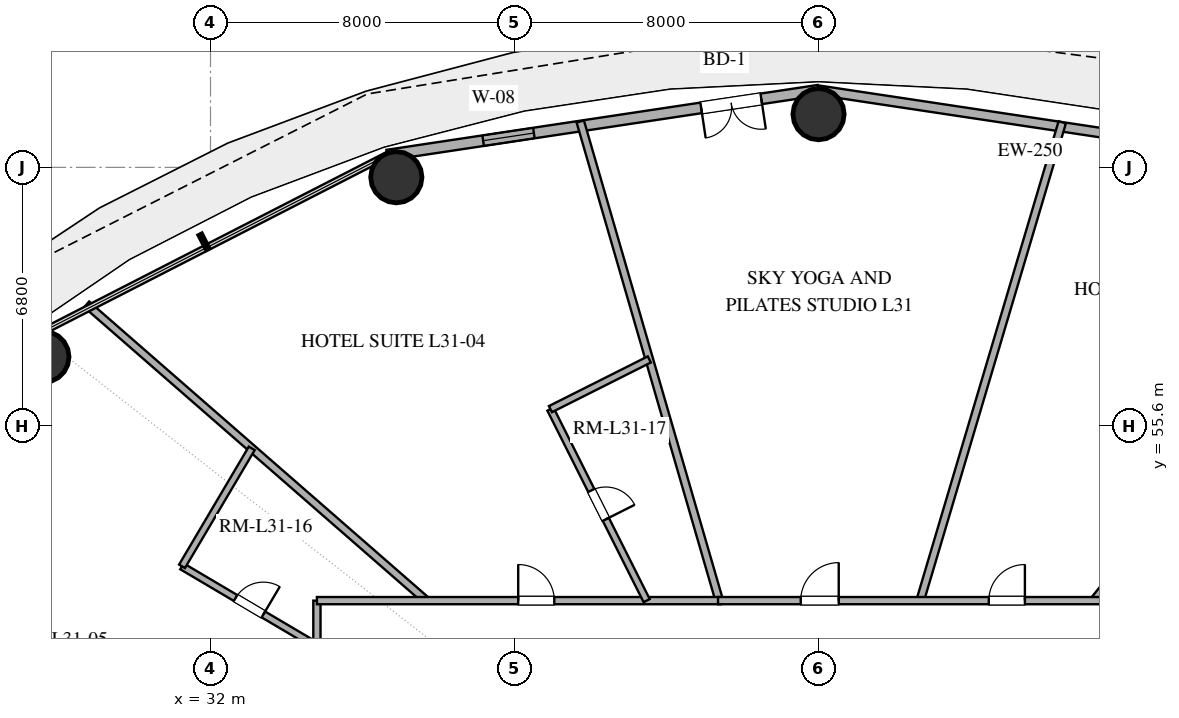
"""IFC4 building model, lengths in metres.
Left out: names, types, materials, properties, quantities, classifications, styles, units other than length and angle.
Written with IfcOpenShell. Run it as: python <this file> out.ifc"""

import sys

from ifc_helpers import new_model, si_unit, direction, frame, frame_2d, origin, origin_2d, place, context, subcontext, project, spatial, rectangle, hollow_circle, extrude, element, fill, save


model = new_model("IFC4")
c1 = context("Model", 3, precision=1e-05, world=origin(), true_north=direction((0.0, 1.0)))
c2 = subcontext(c1, "Body", "Model", "MODEL_VIEW")
j1 = project(units=[si_unit("LENGTHUNIT", "METRE"), si_unit("PLANEANGLEUNIT", "RADIAN")], contexts=[c1])
p1 = place(None, origin())
s1 = spatial("IfcSite", under=j1, at=p1, CompositionType="ELEMENT")
p2 = place(p1, origin())
s2 = spatial("IfcBuilding", under=s1, at=p2, CompositionType="ELEMENT")
p3 = place(p2, frame((0.0, 0.0, 123.6)))
s3 = spatial("IfcBuildingStorey", under=s2, at=p3, CompositionType="ELEMENT", Elevation=123.6)
for number, where, z_axis, x_axis in (
    (1, (48.0, 63.8, 0.0), (0.0, 0.0, 1.0), (1.0, 0.0, 0.0)),
    (2, (36.89, 62.141, 0.0), (0.0, 0.0, 1.0), (1.0, 0.0, 0.0)),
    (3, (27.602, 57.415, 0.0), (0.0, 0.0, 1.0), (1.0, 0.0, 0.0)),
):
    element("IfcColumn", number, at=place(p3, frame(where, z_axis=z_axis, x_axis=x_axis)), inside=s3, PredefinedType="COLUMN", context=c2, shape_type="SweptSolid", body=[
        extrude(hollow_circle(Radius=0.675, WallThickness=0.036, at=origin_2d()), origin(), (0.0, 0.0, 1.0), 3.38),
    ])
p4 = place(p3, frame((59.351, 62.723, 0.0), z_axis=(0.0, 0.0, 1.0), x_axis=(-0.988877774656, 0.148730450117, 0.0)))
e4 = element("IfcWall", 4, at=p4, inside=s3, PredefinedType="SOLIDWALL", context=c2, shape_type="SweptSolid", body=[
    extrude(rectangle(XDim=11.479, YDim=0.25, at=frame_2d((5.74, 0.0))), origin(), (0.0, 0.0, 1.0), 3.38),
])
p5 = place(p3, frame((48.0, 64.43, 0.0), z_axis=(0.0, 0.0, 1.0), x_axis=(-0.988877774656, -0.148730450117, 0.0)))
e5 = element("IfcWall", 5, at=p5, inside=s3, PredefinedType="SOLIDWALL", context=c2, shape_type="SweptSolid", body=[
    extrude(rectangle(XDim=11.479, YDim=0.28, at=frame_2d((5.74, 0.0))), origin(), (0.0, 0.0, 1.0), 3.38),
])
p6 = place(p5, frame((1.524, 0.0, 0.0)))
e6 = element("IfcOpeningElement", 6, at=p6, cuts=e5, PredefinedType="OPENING", context=c2, shape_type="SweptSolid", body=[
    extrude(rectangle(XDim=1.6, YDim=2.25, at=frame_2d((0.8, 1.125))), frame((0.0, 0.15, 0.0), z_axis=(0.0, -1.0, 0.0), x_axis=(1.0, 0.0, 0.0)), (0.0, 0.0, 1.0), 0.3),
])
p7 = place(p5, frame((7.575, 0.0, 0.85)))
e7 = element("IfcOpeningElement", 7, at=p7, cuts=e5, PredefinedType="OPENING", context=c2, shape_type="SweptSolid", body=[
    extrude(rectangle(XDim=1.35, YDim=1.8, at=frame_2d((0.675, 0.9))), frame((0.0, 0.15, 0.0), z_axis=(0.0, -1.0, 0.0), x_axis=(1.0, 0.0, 0.0)), (0.0, 0.0, 1.0), 0.3),
])
p8 = place(p3, frame((54.413, 63.586, 0.0), z_axis=(0.0, 0.0, 1.0), x_axis=(-0.284782789849, -0.958592073098, 0.0)))
e8 = element("IfcWall", 8, at=p8, inside=s3, PredefinedType="PARTITIONING", context=c2, shape_type="SweptSolid", body=[
    extrude(rectangle(XDim=13.129, YDim=0.2, at=frame_2d((6.565, 0.0))), origin(), (0.0, 0.0, 1.0), 2.74),
])
p9 = place(p3, frame((45.388, 51.0, 0.0), z_axis=(0.0, 0.0, 1.0), x_axis=(-0.278690680179, 0.960380916502, 0.0)))
e9 = element("IfcWall", 9, at=p9, inside=s3, PredefinedType="PARTITIONING", context=c2, shape_type="SweptSolid", body=[
    extrude(rectangle(XDim=13.127, YDim=0.2, at=frame_2d((6.563, 0.0))), origin(), (0.0, 0.0, 1.0), 2.74),
])
p10 = place(p3, frame((55.229, 51.0, 0.0), z_axis=(0.0, 0.0, 1.0), x_axis=(0.626239129839, 0.779631035977, 0.0)))
e10 = element("IfcWall", 10, at=p10, inside=s3, PredefinedType="PLUMBINGWALL", context=c2, shape_type="SweptSolid", body=[
    extrude(rectangle(XDim=6.223, YDim=0.18, at=frame_2d((3.112, 0.0))), origin(), (0.0, 0.0, 1.0), 2.74),
])
p11 = place(p10, frame((2.687, 0.0, 0.0)))
e11 = element("IfcOpeningElement", 11, at=p11, cuts=e10, PredefinedType="OPENING", context=c2, shape_type="SweptSolid", body=[
    extrude(rectangle(XDim=0.85, YDim=2.1, at=frame_2d((0.425, 1.05))), frame((0.0, 0.1, 0.0), z_axis=(0.0, -1.0, 0.0), x_axis=(1.0, 0.0, 0.0)), (0.0, 0.0, 1.0), 0.2),
])
p12 = place(p3, frame((37.68, 51.0, 0.0), z_axis=(0.0, 0.0, 1.0), x_axis=(-0.753659518717, 0.657265037749, 0.0)))
e12 = element("IfcWall", 12, at=p12, inside=s3, PredefinedType="PARTITIONING", context=c2, shape_type="SweptSolid", body=[
    extrude(rectangle(XDim=11.861, YDim=0.2, at=frame_2d((5.93, 0.0))), origin(), (0.0, 0.0, 1.0), 2.74),
])
p13 = place(p3, frame((34.8, 41.476, 0.0), z_axis=(0.0, 0.0, 1.0), x_axis=(0.0, 1.0, 0.0)))
e13 = element("IfcWall", 13, at=p13, inside=s3, PredefinedType="PARTITIONING", context=c2, shape_type="SweptSolid", body=[
    extrude(rectangle(XDim=9.524, YDim=0.19, at=frame_2d((4.762, 0.0))), origin(), (0.0, 0.0, 1.0), 2.74),
])
p14 = place(p13, frame((4.924, 0.0, 0.0)))
e14 = element("IfcOpeningElement", 14, at=p14, cuts=e13, PredefinedType="OPENING", context=c2, shape_type="SweptSolid", body=[
    extrude(rectangle(XDim=0.95, YDim=2.15, at=frame_2d((0.475, 1.075))), frame((0.0, 0.105, 0.0), z_axis=(0.0, -1.0, 0.0), x_axis=(1.0, 0.0, 0.0)), (0.0, 0.0, 1.0), 0.21),
])
p15 = place(p3, frame((34.8, 51.0, 0.0), z_axis=(0.0, 0.0, 1.0), x_axis=(1.0, 0.0, 0.0)))
e15 = element("IfcWall", 15, at=p15, inside=s3, PredefinedType="PARTITIONING", context=c2, shape_type="SweptSolid", body=[
    extrude(rectangle(XDim=10.622, YDim=0.19, at=frame_2d((5.311, 0.0))), origin(), (0.0, 0.0, 1.0), 2.74),
])
p16 = place(p15, frame((5.297, 0.0, 0.0)))
e16 = element("IfcOpeningElement", 16, at=p16, cuts=e15, PredefinedType="OPENING", context=c2, shape_type="SweptSolid", body=[
    extrude(rectangle(XDim=0.95, YDim=2.15, at=frame_2d((0.475, 1.075))), frame((0.0, 0.105, 0.0), z_axis=(0.0, -1.0, 0.0), x_axis=(1.0, 0.0, 0.0)), (0.0, 0.0, 1.0), 0.21),
])
p17 = place(p3, frame((40.945, 56.039, 0.0), z_axis=(0.0, 0.0, 1.0), x_axis=(0.44904833135, -0.893507468414, 0.0)))
e17 = element("IfcWall", 17, at=p17, inside=s3, PredefinedType="PLUMBINGWALL", context=c2, shape_type="SweptSolid", body=[
    extrude(rectangle(XDim=5.639, YDim=0.18, at=frame_2d((2.82, 0.0))), origin(), (0.0, 0.0, 1.0), 2.74),
])
p18 = place(p17, frame((2.395, 0.0, 0.0)))
e18 = element("IfcOpeningElement", 18, at=p18, cuts=e17, PredefinedType="OPENING", context=c2, shape_type="SweptSolid", body=[
    extrude(rectangle(XDim=0.85, YDim=2.1, at=frame_2d((0.425, 1.05))), frame((0.0, 0.1, 0.0), z_axis=(0.0, -1.0, 0.0), x_axis=(1.0, 0.0, 0.0)), (0.0, 0.0, 1.0), 0.2),
])
p19 = place(p3, frame((45.355, 51.0, 0.0), z_axis=(0.0, 0.0, 1.0), x_axis=(1.0, 0.0, 0.0)))
e19 = element("IfcWall", 19, at=p19, inside=s3, PredefinedType="PARTITIONING", context=c2, shape_type="SweptSolid", body=[
    extrude(rectangle(XDim=15.845, YDim=0.19, at=frame_2d((7.922, 0.0))), origin(), (0.0, 0.0, 1.0), 2.74),
])
p20 = place(p19, frame((2.176, 0.0, 0.0)))
e20 = element("IfcOpeningElement", 20, at=p20, cuts=e19, PredefinedType="OPENING", context=c2, shape_type="SweptSolid", body=[
    extrude(rectangle(XDim=1.0, YDim=2.2, at=frame_2d((0.5, 1.1))), frame((0.0, 0.105, 0.0), z_axis=(0.0, -1.0, 0.0), x_axis=(1.0, 0.0, 0.0)), (0.0, 0.0, 1.0), 0.21),
])
p21 = place(p19, frame((7.125, 0.0, 0.0)))
e21 = element("IfcOpeningElement", 21, at=p21, cuts=e19, PredefinedType="OPENING", context=c2, shape_type="SweptSolid", body=[
    extrude(rectangle(XDim=0.95, YDim=2.15, at=frame_2d((0.475, 1.075))), frame((0.0, 0.105, 0.0), z_axis=(0.0, -1.0, 0.0), x_axis=(1.0, 0.0, 0.0)), (0.0, 0.0, 1.0), 0.21),
])
p22 = place(p3, frame((31.25, 51.902, 0.0), z_axis=(0.0, 0.0, 1.0), x_axis=(0.860833406846, -0.508886869214, 0.0)))
e22 = element("IfcWall", 22, at=p22, inside=s3, PredefinedType="PLUMBINGWALL", context=c2, shape_type="SweptSolid", body=[
    extrude(rectangle(XDim=4.124, YDim=0.18, at=frame_2d((2.062, 0.0))), origin(), (0.0, 0.0, 1.0), 2.74),
])
p23 = place(p22, frame((1.637, 0.0, 0.0)))
e23 = element("IfcOpeningElement", 23, at=p23, cuts=e22, PredefinedType="OPENING", context=c2, shape_type="SweptSolid", body=[
    extrude(rectangle(XDim=0.85, YDim=2.1, at=frame_2d((0.425, 1.05))), frame((0.0, 0.1, 0.0), z_axis=(0.0, -1.0, 0.0), x_axis=(1.0, 0.0, 0.0)), (0.0, 0.0, 1.0), 0.2),
])
p24 = place(p3, frame((33.085, 55.007, 0.0), z_axis=(0.0, 0.0, 1.0), x_axis=(-0.508909491775, -0.860820032981, 0.0)))
e24 = element("IfcWall", 24, at=p24, inside=s3, PredefinedType="PLUMBINGWALL", context=c2, shape_type="SweptSolid", body=[
    extrude(rectangle(XDim=3.606, YDim=0.18, at=frame_2d((1.803, 0.0))), origin(), (0.0, 0.0, 1.0), 2.74),
])
p25 = place(p3, frame((43.547, 57.346, 0.0), z_axis=(0.0, 0.0, 1.0), x_axis=(-0.893519933294, -0.449023528122, 0.0)))
e25 = element("IfcWall", 25, at=p25, inside=s3, PredefinedType="PLUMBINGWALL", context=c2, shape_type="SweptSolid", body=[
    extrude(rectangle(XDim=2.912, YDim=0.18, at=frame_2d((1.456, 0.0))), origin(), (0.0, 0.0, 1.0), 2.74),
])
p26 = place(p6, origin())
e26 = element("IfcDoor", 26, at=p26, inside=s3, OperationType="DOUBLE_DOOR_SINGLE_SWING", PredefinedType="DOOR", context=c2, shape_type="SweptSolid", body=[
    extrude(rectangle(XDim=1.6, YDim=2.25, at=frame_2d((0.8, 1.125))), frame((0.0, 0.025, 0.0), z_axis=(0.0, -1.0, 0.0), x_axis=(1.0, 0.0, 0.0)), (0.0, 0.0, 1.0), 0.05),
])
fill(e6, e26)
p27 = place(p7, origin())
e27 = element("IfcWindow", 27, at=p27, inside=s3, PartitioningType="SINGLE_PANEL", PredefinedType="WINDOW", context=c2, shape_type="SweptSolid", body=[
    extrude(rectangle(XDim=1.35, YDim=1.8, at=frame_2d((0.675, 0.9))), frame((0.0, 0.03, 0.0), z_axis=(0.0, -1.0, 0.0), x_axis=(1.0, 0.0, 0.0)), (0.0, 0.0, 1.0), 0.06),
])
fill(e7, e27)
p28 = place(p16, origin())
e28 = element("IfcDoor", 28, at=p28, inside=s3, OperationType="SINGLE_SWING_LEFT", PredefinedType="DOOR", context=c2, shape_type="SweptSolid", body=[
    extrude(rectangle(XDim=0.95, YDim=2.15, at=frame_2d((0.475, 1.075))), frame((0.0, 0.025, 0.0), z_axis=(0.0, -1.0, 0.0), x_axis=(1.0, 0.0, 0.0)), (0.0, 0.0, 1.0), 0.05),
])
fill(e16, e28)
p29 = place(p18, origin())
e29 = element("IfcDoor", 29, at=p29, inside=s3, OperationType="SINGLE_SWING_RIGHT", PredefinedType="DOOR", context=c2, shape_type="SweptSolid", body=[
    extrude(rectangle(XDim=0.85, YDim=2.1, at=frame_2d((0.425, 1.05))), frame((0.0, 0.025, 0.0), z_axis=(0.0, -1.0, 0.0), x_axis=(1.0, 0.0, 0.0)), (0.0, 0.0, 1.0), 0.05),
])
fill(e18, e29)
p30 = place(p20, origin())
e30 = element("IfcDoor", 30, at=p30, inside=s3, OperationType="SINGLE_SWING_RIGHT", PredefinedType="DOOR", context=c2, shape_type="SweptSolid", body=[
    extrude(rectangle(XDim=1.0, YDim=2.2, at=frame_2d((0.5, 1.1))), frame((0.0, 0.025, 0.0), z_axis=(0.0, -1.0, 0.0), x_axis=(1.0, 0.0, 0.0)), (0.0, 0.0, 1.0), 0.05),
])
fill(e20, e30)
p31 = place(p21, origin())
e31 = element("IfcDoor", 31, at=p31, inside=s3, OperationType="SINGLE_SWING_RIGHT", PredefinedType="DOOR", context=c2, shape_type="SweptSolid", body=[
    extrude(rectangle(XDim=0.95, YDim=2.15, at=frame_2d((0.475, 1.075))), frame((0.0, 0.025, 0.0), z_axis=(0.0, -1.0, 0.0), x_axis=(1.0, 0.0, 0.0)), (0.0, 0.0, 1.0), 0.05),
])
fill(e21, e31)
p32 = place(p23, origin())
e32 = element("IfcDoor", 32, at=p32, inside=s3, OperationType="SINGLE_SWING_RIGHT", PredefinedType="DOOR", context=c2, shape_type="SweptSolid", body=[
    extrude(rectangle(XDim=0.85, YDim=2.1, at=frame_2d((0.425, 1.05))), frame((0.0, 0.025, 0.0), z_axis=(0.0, -1.0, 0.0), x_axis=(1.0, 0.0, 0.0)), (0.0, 0.0, 1.0), 0.05),
])
fill(e23, e32)
save(model, sys.argv[1])
